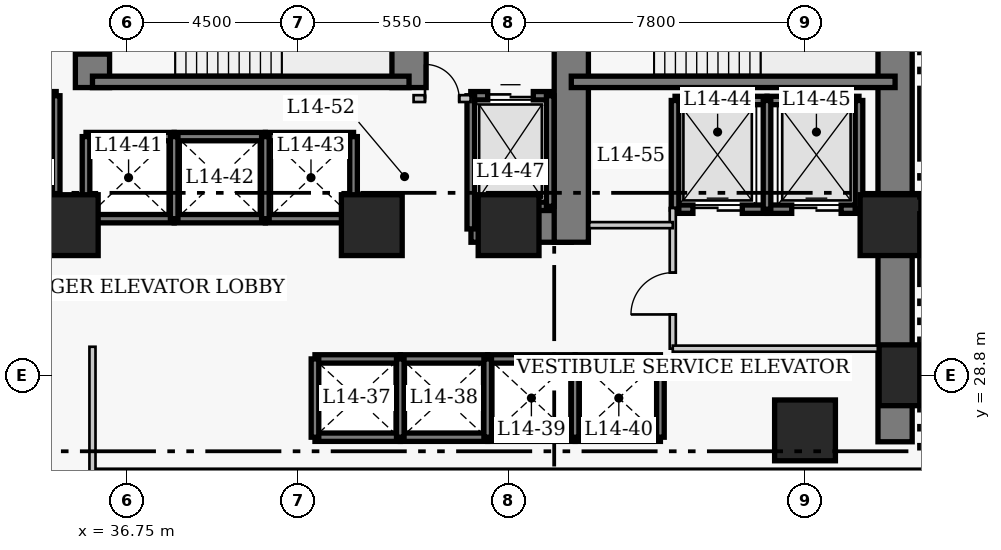
"""IFC4 building model, lengths in metres.
Left out: names, types, materials, properties, quantities, classifications, styles, units other than length and angle.
Written with IfcOpenShell. Run it as: python <this file> out.ifc"""

import sys

from ifc_helpers import new_model, si_unit, direction, frame, frame_2d, origin, origin_2d, place, context, subcontext, project, spatial, rectangle, extrude, element, fill, save


model = new_model("IFC4")
c1 = context("Model", 3, precision=1e-05, world=origin(), true_north=direction((0.0, 1.0)))
c2 = subcontext(c1, "Body", "Model", "MODEL_VIEW")
j1 = project(units=[si_unit("LENGTHUNIT", "METRE"), si_unit("PLANEANGLEUNIT", "RADIAN")], contexts=[c1])
p1 = place(None, origin())
s1 = spatial("IfcSite", under=j1, at=p1, CompositionType="ELEMENT")
p2 = place(p1, origin())
s2 = spatial("IfcBuilding", under=s1, at=p2, CompositionType="ELEMENT")
p3 = place(p2, frame((0.0, 0.0, 60.2)))
s3 = spatial("IfcBuildingStorey", under=s2, at=p3, CompositionType="ELEMENT", Elevation=60.2)
p4 = place(p3, frame((56.97, 27.05, 0.0), z_axis=(0.0, 0.0, 1.0), x_axis=(0.0, 1.0, 0.0)))
e1 = element("IfcWall", 1, at=p4, inside=s3, PredefinedType="SHEAR", context=c2, shape_type="SweptSolid", body=[
    extrude(rectangle(XDim=13.72, YDim=0.9, at=frame_2d((6.86, 0.0))), origin(), (0.0, 0.0, 1.0), 3.8),
])
p5 = place(p3, frame((45.81, 32.75, 0.0), z_axis=(0.0, 0.0, 1.0), x_axis=(1.0, 0.0, 0.0)))
e2 = element("IfcWall", 2, at=p5, inside=s3, PredefinedType="SHEAR", context=c2, shape_type="SweptSolid", body=[
    extrude(rectangle(XDim=2.64, YDim=0.9, at=frame_2d((1.32, 0.0))), origin(), (0.0, 0.0, 1.0), 3.8),
])
p6 = place(p3, frame((35.85, 36.37, 0.0), z_axis=(0.0, 0.0, 1.0), x_axis=(0.0, 1.0, 0.0)))
e3 = element("IfcWall", 3, at=p6, inside=s3, PredefinedType="SHEAR", context=c2, shape_type="SweptSolid", body=[
    extrude(rectangle(XDim=3.95, YDim=0.9, at=frame_2d((1.975, 0.0))), origin(), (0.0, 0.0, 1.0), 3.8),
])
p7 = place(p6, frame((0.88, 0.0, 0.0)))
e4 = element("IfcOpeningElement", 4, at=p7, cuts=e3, PredefinedType="OPENING", context=c2, shape_type="SweptSolid", body=[
    extrude(rectangle(XDim=1.1, YDim=2.15, at=frame_2d((0.55, 1.075))), frame((0.0, 0.46, 0.0), z_axis=(0.0, -1.0, 0.0), x_axis=(1.0, 0.0, 0.0)), (0.0, 0.0, 1.0), 0.92),
])
p8 = place(p3, frame((44.18, 36.37, 0.0), z_axis=(0.0, 0.0, 1.0), x_axis=(0.0, 1.0, 0.0)))
e5 = element("IfcWall", 5, at=p8, inside=s3, PredefinedType="SHEAR", context=c2, shape_type="SweptSolid", body=[
    extrude(rectangle(XDim=3.95, YDim=0.9, at=frame_2d((1.975, 0.0))), origin(), (0.0, 0.0, 1.0), 3.8),
])
p9 = place(p3, frame((48.45, 32.3, 0.0), z_axis=(0.0, 0.0, 1.0), x_axis=(0.0, 1.0, 0.0)))
e6 = element("IfcWall", 6, at=p9, inside=s3, PredefinedType="SHEAR", context=c2, shape_type="SweptSolid", body=[
    extrude(rectangle(XDim=8.02, YDim=0.9, at=frame_2d((4.01, 0.0))), origin(), (0.0, 0.0, 1.0), 3.8),
])
p10 = place(p9, frame((5.9, 0.0, 0.0)))
e7 = element("IfcOpeningElement", 7, at=p10, cuts=e6, PredefinedType="OPENING", context=c2, shape_type="SweptSolid", body=[
    extrude(rectangle(XDim=1.1, YDim=2.15, at=frame_2d((0.55, 1.075))), frame((0.0, 0.46, 0.0), z_axis=(0.0, -1.0, 0.0), x_axis=(1.0, 0.0, 0.0)), (0.0, 0.0, 1.0), 0.92),
])
p11 = place(p3, frame((35.85, 36.52, 0.0), z_axis=(0.0, 0.0, 1.0), x_axis=(1.0, 0.0, 0.0)))
e8 = element("IfcWall", 8, at=p11, inside=s3, PredefinedType="SHEAR", context=c2, shape_type="SweptSolid", body=[
    extrude(rectangle(XDim=8.33, YDim=0.3, at=frame_2d((4.165, 0.0))), origin(), (0.0, 0.0, 1.0), 3.8),
])
p12 = place(p3, frame((48.45, 36.52, 0.0), z_axis=(0.0, 0.0, 1.0), x_axis=(1.0, 0.0, 0.0)))
e9 = element("IfcWall", 9, at=p12, inside=s3, PredefinedType="SHEAR", context=c2, shape_type="SweptSolid", body=[
    extrude(rectangle(XDim=8.52, YDim=0.3, at=frame_2d((4.26, 0.0))), origin(), (0.0, 0.0, 1.0), 3.8),
])
for number, where, z_axis, x_axis in (
    (10, (57.35, 28.8, 0.0), (0.0, 0.0, 1.0), (1.0, 0.0, 0.0)),
    (11, (35.2, 32.75, 0.0), (0.0, 0.0, 1.0), (1.0, 0.0, 0.0)),
    (12, (43.2, 32.75, 0.0), (0.0, 0.0, 1.0), (1.0, 0.0, 0.0)),
    (13, (46.8, 32.75, 0.0), (0.0, 0.0, 1.0), (1.0, 0.0, 0.0)),
    (14, (54.6, 27.35, 0.0), (0.0, 0.0, 1.0), (1.0, 0.0, 0.0)),
    (15, (56.85, 32.75, 0.0), (0.0, 0.0, 1.0), (1.0, 0.0, 0.0)),
):
    element("IfcColumn", number, at=place(p3, frame(where, z_axis=z_axis, x_axis=x_axis)), inside=s3, PredefinedType="COLUMN", context=c2, shape_type="SweptSolid", body=[
        extrude(rectangle(XDim=1.6, YDim=1.6, at=origin_2d()), origin(), (0.0, 0.0, 1.0), 3.8),
    ])
for number, where, z_axis, x_axis in (
    (16, (41.705, 29.23, 0.0), (0.0, 0.0, 1.0), (1.0, 0.0, 0.0)),
    (17, (41.705, 27.17, 0.0), (0.0, 0.0, 1.0), (1.0, 0.0, 0.0)),
):
    element("IfcWall", number, at=place(p3, frame(where, z_axis=z_axis, x_axis=x_axis)), inside=s3, PredefinedType="SHEAR", context=c2, shape_type="SweptSolid", body=[
        extrude(rectangle(XDim=2.245, YDim=0.22, at=frame_2d((1.123, 0.0))), origin(), (0.0, 0.0, 1.0), 3.8),
    ])
p13 = place(p3, frame((41.705, 27.17, 0.0), z_axis=(0.0, 0.0, 1.0), x_axis=(0.0, 1.0, 0.0)))
e18 = element("IfcWall", 18, at=p13, inside=s3, PredefinedType="SHEAR", context=c2, shape_type="SweptSolid", body=[
    extrude(rectangle(XDim=2.06, YDim=0.2, at=frame_2d((1.03, 0.0))), origin(), (0.0, 0.0, 1.0), 3.8),
])
for number, where, z_axis, x_axis in (
    (19, (43.95, 29.23, 0.0), (0.0, 0.0, 1.0), (1.0, 0.0, 0.0)),
    (20, (43.95, 27.17, 0.0), (0.0, 0.0, 1.0), (1.0, 0.0, 0.0)),
):
    element("IfcWall", number, at=place(p3, frame(where, z_axis=z_axis, x_axis=x_axis)), inside=s3, PredefinedType="SHEAR", context=c2, shape_type="SweptSolid", body=[
        extrude(rectangle(XDim=2.3, YDim=0.22, at=frame_2d((1.15, 0.0))), origin(), (0.0, 0.0, 1.0), 3.8),
    ])
p14 = place(p3, frame((43.95, 27.17, 0.0), z_axis=(0.0, 0.0, 1.0), x_axis=(0.0, 1.0, 0.0)))
e21 = element("IfcWall", 21, at=p14, inside=s3, PredefinedType="SHEAR", context=c2, shape_type="SweptSolid", body=[
    extrude(rectangle(XDim=2.06, YDim=0.2, at=frame_2d((1.03, 0.0))), origin(), (0.0, 0.0, 1.0), 3.8),
])
for number, where, z_axis, x_axis in (
    (22, (46.25, 29.23, 0.0), (0.0, 0.0, 1.0), (1.0, 0.0, 0.0)),
    (23, (46.25, 27.17, 0.0), (0.0, 0.0, 1.0), (1.0, 0.0, 0.0)),
):
    element("IfcWall", number, at=place(p3, frame(where, z_axis=z_axis, x_axis=x_axis)), inside=s3, PredefinedType="SHEAR", context=c2, shape_type="SweptSolid", body=[
        extrude(rectangle(XDim=2.3, YDim=0.22, at=frame_2d((1.15, 0.0))), origin(), (0.0, 0.0, 1.0), 3.8),
    ])
p15 = place(p3, frame((46.25, 27.17, 0.0), z_axis=(0.0, 0.0, 1.0), x_axis=(0.0, 1.0, 0.0)))
e24 = element("IfcWall", 24, at=p15, inside=s3, PredefinedType="SHEAR", context=c2, shape_type="SweptSolid", body=[
    extrude(rectangle(XDim=2.06, YDim=0.2, at=frame_2d((1.03, 0.0))), origin(), (0.0, 0.0, 1.0), 3.8),
])
for number, where, z_axis, x_axis in (
    (25, (48.55, 29.23, 0.0), (0.0, 0.0, 1.0), (1.0, 0.0, 0.0)),
    (26, (48.55, 27.17, 0.0), (0.0, 0.0, 1.0), (1.0, 0.0, 0.0)),
):
    element("IfcWall", number, at=place(p3, frame(where, z_axis=z_axis, x_axis=x_axis)), inside=s3, PredefinedType="SHEAR", context=c2, shape_type="SweptSolid", body=[
        extrude(rectangle(XDim=2.245, YDim=0.22, at=frame_2d((1.123, 0.0))), origin(), (0.0, 0.0, 1.0), 3.8),
    ])
for number, where, z_axis, x_axis in (
    (27, (48.55, 27.17, 0.0), (0.0, 0.0, 1.0), (0.0, 1.0, 0.0)),
    (28, (50.795, 27.17, 0.0), (0.0, 0.0, 1.0), (0.0, 1.0, 0.0)),
):
    element("IfcWall", number, at=place(p3, frame(where, z_axis=z_axis, x_axis=x_axis)), inside=s3, PredefinedType="SHEAR", context=c2, shape_type="SweptSolid", body=[
        extrude(rectangle(XDim=2.06, YDim=0.2, at=frame_2d((1.03, 0.0))), origin(), (0.0, 0.0, 1.0), 3.8),
    ])
for number, where, z_axis, x_axis in (
    (29, (35.68, 35.08, 0.0), (0.0, 0.0, 1.0), (1.0, 0.0, 0.0)),
    (30, (35.68, 32.92, 0.0), (0.0, 0.0, 1.0), (1.0, 0.0, 0.0)),
):
    element("IfcWall", number, at=place(p3, frame(where, z_axis=z_axis, x_axis=x_axis)), inside=s3, PredefinedType="SHEAR", context=c2, shape_type="SweptSolid", body=[
        extrude(rectangle(XDim=2.32, YDim=0.22, at=frame_2d((1.16, 0.0))), origin(), (0.0, 0.0, 1.0), 3.8),
    ])
p16 = place(p3, frame((35.68, 32.92, 0.0), z_axis=(0.0, 0.0, 1.0), x_axis=(0.0, 1.0, 0.0)))
e31 = element("IfcWall", 31, at=p16, inside=s3, PredefinedType="SHEAR", context=c2, shape_type="SweptSolid", body=[
    extrude(rectangle(XDim=2.16, YDim=0.2, at=frame_2d((1.08, 0.0))), origin(), (0.0, 0.0, 1.0), 3.8),
])
for number, where, z_axis, x_axis in (
    (32, (38.0, 35.08, 0.0), (0.0, 0.0, 1.0), (1.0, 0.0, 0.0)),
    (33, (38.0, 32.92, 0.0), (0.0, 0.0, 1.0), (1.0, 0.0, 0.0)),
):
    element("IfcWall", number, at=place(p3, frame(where, z_axis=z_axis, x_axis=x_axis)), inside=s3, PredefinedType="SHEAR", context=c2, shape_type="SweptSolid", body=[
        extrude(rectangle(XDim=2.4, YDim=0.22, at=frame_2d((1.2, 0.0))), origin(), (0.0, 0.0, 1.0), 3.8),
    ])
p17 = place(p3, frame((38.0, 32.92, 0.0), z_axis=(0.0, 0.0, 1.0), x_axis=(0.0, 1.0, 0.0)))
e34 = element("IfcWall", 34, at=p17, inside=s3, PredefinedType="SHEAR", context=c2, shape_type="SweptSolid", body=[
    extrude(rectangle(XDim=2.16, YDim=0.2, at=frame_2d((1.08, 0.0))), origin(), (0.0, 0.0, 1.0), 3.8),
])
for number, where, z_axis, x_axis in (
    (35, (40.4, 35.08, 0.0), (0.0, 0.0, 1.0), (1.0, 0.0, 0.0)),
    (36, (40.4, 32.92, 0.0), (0.0, 0.0, 1.0), (1.0, 0.0, 0.0)),
):
    element("IfcWall", number, at=place(p3, frame(where, z_axis=z_axis, x_axis=x_axis)), inside=s3, PredefinedType="SHEAR", context=c2, shape_type="SweptSolid", body=[
        extrude(rectangle(XDim=2.32, YDim=0.22, at=frame_2d((1.16, 0.0))), origin(), (0.0, 0.0, 1.0), 3.8),
    ])
for number, where, z_axis, x_axis in (
    (37, (40.4, 32.92, 0.0), (0.0, 0.0, 1.0), (0.0, 1.0, 0.0)),
    (38, (42.72, 32.92, 0.0), (0.0, 0.0, 1.0), (0.0, 1.0, 0.0)),
):
    element("IfcWall", number, at=place(p3, frame(where, z_axis=z_axis, x_axis=x_axis)), inside=s3, PredefinedType="SHEAR", context=c2, shape_type="SweptSolid", body=[
        extrude(rectangle(XDim=2.16, YDim=0.2, at=frame_2d((1.08, 0.0))), origin(), (0.0, 0.0, 1.0), 3.8),
    ])
p18 = place(p3, frame((51.18, 36.03, 0.0), z_axis=(0.0, 0.0, 1.0), x_axis=(1.0, 0.0, 0.0)))
e39 = element("IfcWall", 39, at=p18, inside=s3, PredefinedType="SHEAR", context=c2, shape_type="SweptSolid", body=[
    extrude(rectangle(XDim=2.42, YDim=0.22, at=frame_2d((1.21, 0.0))), origin(), (0.0, 0.0, 1.0), 3.8),
])
p19 = place(p3, frame((51.18, 33.17, 0.0), z_axis=(0.0, 0.0, 1.0), x_axis=(1.0, 0.0, 0.0)))
e40 = element("IfcWall", 40, at=p19, inside=s3, PredefinedType="SHEAR", context=c2, shape_type="SweptSolid", body=[
    extrude(rectangle(XDim=2.42, YDim=0.22, at=frame_2d((1.21, 0.0))), origin(), (0.0, 0.0, 1.0), 3.8),
])
p20 = place(p19, frame((0.47, 0.0, 0.0)))
e41 = element("IfcOpeningElement", 41, at=p20, cuts=e40, PredefinedType="OPENING", context=c2, shape_type="SweptSolid", body=[
    extrude(rectangle(XDim=1.3, YDim=2.15, at=frame_2d((0.65, 1.075))), frame((0.0, 0.12, 0.0), z_axis=(0.0, -1.0, 0.0), x_axis=(1.0, 0.0, 0.0)), (0.0, 0.0, 1.0), 0.24),
])
p21 = place(p3, frame((51.18, 33.17, 0.0), z_axis=(0.0, 0.0, 1.0), x_axis=(0.0, 1.0, 0.0)))
e42 = element("IfcWall", 42, at=p21, inside=s3, PredefinedType="SHEAR", context=c2, shape_type="SweptSolid", body=[
    extrude(rectangle(XDim=2.86, YDim=0.2, at=frame_2d((1.43, 0.0))), origin(), (0.0, 0.0, 1.0), 3.8),
])
p22 = place(p3, frame((53.6, 36.03, 0.0), z_axis=(0.0, 0.0, 1.0), x_axis=(1.0, 0.0, 0.0)))
e43 = element("IfcWall", 43, at=p22, inside=s3, PredefinedType="SHEAR", context=c2, shape_type="SweptSolid", body=[
    extrude(rectangle(XDim=2.42, YDim=0.22, at=frame_2d((1.21, 0.0))), origin(), (0.0, 0.0, 1.0), 3.8),
])
p23 = place(p3, frame((53.6, 33.17, 0.0), z_axis=(0.0, 0.0, 1.0), x_axis=(1.0, 0.0, 0.0)))
e44 = element("IfcWall", 44, at=p23, inside=s3, PredefinedType="SHEAR", context=c2, shape_type="SweptSolid", body=[
    extrude(rectangle(XDim=2.42, YDim=0.22, at=frame_2d((1.21, 0.0))), origin(), (0.0, 0.0, 1.0), 3.8),
])
p24 = place(p23, frame((0.65, 0.0, 0.0)))
e45 = element("IfcOpeningElement", 45, at=p24, cuts=e44, PredefinedType="OPENING", context=c2, shape_type="SweptSolid", body=[
    extrude(rectangle(XDim=1.3, YDim=2.15, at=frame_2d((0.65, 1.075))), frame((0.0, 0.12, 0.0), z_axis=(0.0, -1.0, 0.0), x_axis=(1.0, 0.0, 0.0)), (0.0, 0.0, 1.0), 0.24),
])
for number, where, z_axis, x_axis in (
    (46, (53.6, 33.17, 0.0), (0.0, 0.0, 1.0), (0.0, 1.0, 0.0)),
    (47, (56.02, 33.17, 0.0), (0.0, 0.0, 1.0), (0.0, 1.0, 0.0)),
):
    element("IfcWall", number, at=place(p3, frame(where, z_axis=z_axis, x_axis=x_axis)), inside=s3, PredefinedType="SHEAR", context=c2, shape_type="SweptSolid", body=[
        extrude(rectangle(XDim=2.86, YDim=0.2, at=frame_2d((1.43, 0.0))), origin(), (0.0, 0.0, 1.0), 3.8),
    ])
p25 = place(p3, frame((32.805, 36.155, 0.0), z_axis=(0.0, 0.0, 1.0), x_axis=(1.0, 0.0, 0.0)))
e48 = element("IfcWall", 48, at=p25, inside=s3, PredefinedType="SHEAR", context=c2, shape_type="SweptSolid", body=[
    extrude(rectangle(XDim=2.09, YDim=0.22, at=frame_2d((1.045, 0.0))), origin(), (0.0, 0.0, 1.0), 3.8),
])
p26 = place(p25, frame((0.445, 0.0, 0.0)))
e49 = element("IfcOpeningElement", 49, at=p26, cuts=e48, PredefinedType="OPENING", context=c2, shape_type="SweptSolid", body=[
    extrude(rectangle(XDim=1.2, YDim=2.15, at=frame_2d((0.6, 1.075))), frame((0.0, 0.12, 0.0), z_axis=(0.0, -1.0, 0.0), x_axis=(1.0, 0.0, 0.0)), (0.0, 0.0, 1.0), 0.24),
])
p27 = place(p3, frame((32.805, 33.245, 0.0), z_axis=(0.0, 0.0, 1.0), x_axis=(1.0, 0.0, 0.0)))
e50 = element("IfcWall", 50, at=p27, inside=s3, PredefinedType="SHEAR", context=c2, shape_type="SweptSolid", body=[
    extrude(rectangle(XDim=2.09, YDim=0.22, at=frame_2d((1.045, 0.0))), origin(), (0.0, 0.0, 1.0), 3.8),
])
p28 = place(p3, frame((34.895, 33.245, 0.0), z_axis=(0.0, 0.0, 1.0), x_axis=(0.0, 1.0, 0.0)))
e51 = element("IfcWall", 51, at=p28, inside=s3, PredefinedType="SHEAR", context=c2, shape_type="SweptSolid", body=[
    extrude(rectangle(XDim=2.91, YDim=0.2, at=frame_2d((1.455, 0.0))), origin(), (0.0, 0.0, 1.0), 3.8),
])
p29 = place(p3, frame((45.805, 36.155, 0.0), z_axis=(0.0, 0.0, 1.0), x_axis=(1.0, 0.0, 0.0)))
e52 = element("IfcWall", 52, at=p29, inside=s3, PredefinedType="SHEAR", context=c2, shape_type="SweptSolid", body=[
    extrude(rectangle(XDim=2.09, YDim=0.22, at=frame_2d((1.045, 0.0))), origin(), (0.0, 0.0, 1.0), 3.8),
])
p30 = place(p29, frame((0.445, 0.0, 0.0)))
e53 = element("IfcOpeningElement", 53, at=p30, cuts=e52, PredefinedType="OPENING", context=c2, shape_type="SweptSolid", body=[
    extrude(rectangle(XDim=1.2, YDim=2.15, at=frame_2d((0.6, 1.075))), frame((0.0, 0.12, 0.0), z_axis=(0.0, -1.0, 0.0), x_axis=(1.0, 0.0, 0.0)), (0.0, 0.0, 1.0), 0.24),
])
p31 = place(p3, frame((45.805, 33.245, 0.0), z_axis=(0.0, 0.0, 1.0), x_axis=(1.0, 0.0, 0.0)))
e54 = element("IfcWall", 54, at=p31, inside=s3, PredefinedType="SHEAR", context=c2, shape_type="SweptSolid", body=[
    extrude(rectangle(XDim=2.09, YDim=0.22, at=frame_2d((1.045, 0.0))), origin(), (0.0, 0.0, 1.0), 3.8),
])
p32 = place(p3, frame((45.805, 32.65, 0.0), z_axis=(0.0, 0.0, 1.0), x_axis=(0.0, 1.0, 0.0)))
e55 = element("IfcWall", 55, at=p32, inside=s3, PredefinedType="SHEAR", context=c2, shape_type="SweptSolid", body=[
    extrude(rectangle(XDim=3.505, YDim=0.2, at=frame_2d((1.752, 0.0))), origin(), (0.0, 0.0, 1.0), 3.8),
])
p33 = place(p3, frame((47.895, 33.245, 0.0), z_axis=(0.0, 0.0, 1.0), x_axis=(0.0, 1.0, 0.0)))
e56 = element("IfcWall", 56, at=p33, inside=s3, PredefinedType="SHEAR", context=c2, shape_type="SweptSolid", body=[
    extrude(rectangle(XDim=2.91, YDim=0.2, at=frame_2d((1.455, 0.0))), origin(), (0.0, 0.0, 1.0), 3.8),
])
p34 = place(p3, frame((44.3, 36.08, 0.0), z_axis=(0.0, 0.0, 1.0), x_axis=(1.0, 0.0, 0.0)))
e57 = element("IfcWall", 57, at=p34, inside=s3, PredefinedType="PARTITIONING", context=c2, shape_type="SweptSolid", body=[
    extrude(rectangle(XDim=1.5, YDim=0.18, at=frame_2d((0.75, 0.0))), origin(), (0.0, 0.0, 1.0), 3.54),
])
p35 = place(p34, frame((0.3, 0.0, 0.0)))
e58 = element("IfcOpeningElement", 58, at=p35, cuts=e57, PredefinedType="OPENING", context=c2, shape_type="SweptSolid", body=[
    extrude(rectangle(XDim=0.9, YDim=2.15, at=frame_2d((0.45, 1.075))), frame((0.0, 0.1, 0.0), z_axis=(0.0, -1.0, 0.0), x_axis=(1.0, 0.0, 0.0)), (0.0, 0.0, 1.0), 0.2),
])
p36 = place(p3, frame((51.12, 29.5, 0.0), z_axis=(0.0, 0.0, 1.0), x_axis=(0.0, 1.0, 0.0)))
e59 = element("IfcWall", 59, at=p36, inside=s3, PredefinedType="PARTITIONING", context=c2, shape_type="SweptSolid", body=[
    extrude(rectangle(XDim=3.7, YDim=0.16, at=frame_2d((1.85, 0.0))), origin(), (0.0, 0.0, 1.0), 3.54),
])
p37 = place(p36, frame((0.9, 0.0, 0.0)))
e60 = element("IfcOpeningElement", 60, at=p37, cuts=e59, PredefinedType="OPENING", context=c2, shape_type="SweptSolid", body=[
    extrude(rectangle(XDim=1.1, YDim=2.15, at=frame_2d((0.55, 1.075))), frame((0.0, 0.09, 0.0), z_axis=(0.0, -1.0, 0.0), x_axis=(1.0, 0.0, 0.0)), (0.0, 0.0, 1.0), 0.18),
])
p38 = place(p3, frame((51.12, 29.5, 0.0), z_axis=(0.0, 0.0, 1.0), x_axis=(1.0, 0.0, 0.0)))
e61 = element("IfcWall", 61, at=p38, inside=s3, PredefinedType="PARTITIONING", context=c2, shape_type="SweptSolid", body=[
    extrude(rectangle(XDim=5.63, YDim=0.16, at=frame_2d((2.815, 0.0))), origin(), (0.0, 0.0, 1.0), 3.54),
])
p39 = place(p3, frame((48.92, 32.75, 0.0), z_axis=(0.0, 0.0, 1.0), x_axis=(1.0, 0.0, 0.0)))
e62 = element("IfcWall", 62, at=p39, inside=s3, PredefinedType="PARTITIONING", context=c2, shape_type="SweptSolid", body=[
    extrude(rectangle(XDim=2.2, YDim=0.16, at=frame_2d((1.1, 0.0))), origin(), (0.0, 0.0, 1.0), 3.54),
])
p40 = place(p3, frame((35.85, 26.26, 0.0), z_axis=(0.0, 0.0, 1.0), x_axis=(1.0, 0.0, 0.0)))
e63 = element("IfcWall", 63, at=p40, inside=s3, PredefinedType="PARTITIONING", context=c2, shape_type="SweptSolid", body=[
    extrude(rectangle(XDim=23.45, YDim=0.16, at=frame_2d((11.725, 0.0))), origin(), (0.0, 0.0, 1.0), 3.54),
])
p41 = place(p3, frame((35.85, 26.26, 0.0), z_axis=(0.0, 0.0, 1.0), x_axis=(0.0, 1.0, 0.0)))
e64 = element("IfcWall", 64, at=p41, inside=s3, PredefinedType="PARTITIONING", context=c2, shape_type="SweptSolid", body=[
    extrude(rectangle(XDim=3.29, YDim=0.16, at=frame_2d((1.645, 0.0))), origin(), (0.0, 0.0, 1.0), 3.54),
])
p42 = place(p20, origin())
e65 = element("IfcDoor", 65, at=p42, inside=s3, OperationType="DOUBLE_DOOR_SLIDING", PredefinedType="DOOR", context=c2, shape_type="SweptSolid", body=[
    extrude(rectangle(XDim=1.3, YDim=2.15, at=frame_2d((0.65, 1.075))), frame((0.0, 0.025, 0.0), z_axis=(0.0, -1.0, 0.0), x_axis=(1.0, 0.0, 0.0)), (0.0, 0.0, 1.0), 0.05),
])
fill(e41, e65)
p43 = place(p24, origin())
e66 = element("IfcDoor", 66, at=p43, inside=s3, OperationType="DOUBLE_DOOR_SLIDING", PredefinedType="DOOR", context=c2, shape_type="SweptSolid", body=[
    extrude(rectangle(XDim=1.3, YDim=2.15, at=frame_2d((0.65, 1.075))), frame((0.0, 0.025, 0.0), z_axis=(0.0, -1.0, 0.0), x_axis=(1.0, 0.0, 0.0)), (0.0, 0.0, 1.0), 0.05),
])
fill(e45, e66)
p44 = place(p30, origin())
e67 = element("IfcDoor", 67, at=p44, inside=s3, OperationType="DOUBLE_DOOR_SLIDING", PredefinedType="DOOR", context=c2, shape_type="SweptSolid", body=[
    extrude(rectangle(XDim=1.2, YDim=2.15, at=frame_2d((0.6, 1.075))), frame((0.0, 0.025, 0.0), z_axis=(0.0, -1.0, 0.0), x_axis=(1.0, 0.0, 0.0)), (0.0, 0.0, 1.0), 0.05),
])
fill(e53, e67)
p45 = place(p35, origin())
e68 = element("IfcDoor", 68, at=p45, inside=s3, OperationType="SINGLE_SWING_LEFT", PredefinedType="DOOR", context=c2, shape_type="SweptSolid", body=[
    extrude(rectangle(XDim=0.9, YDim=2.15, at=frame_2d((0.45, 1.075))), frame((0.0, 0.025, 0.0), z_axis=(0.0, -1.0, 0.0), x_axis=(1.0, 0.0, 0.0)), (0.0, 0.0, 1.0), 0.05),
])
fill(e58, e68)
p46 = place(p37, origin())
e69 = element("IfcDoor", 69, at=p46, inside=s3, OperationType="SINGLE_SWING_LEFT", PredefinedType="DOOR", context=c2, shape_type="SweptSolid", body=[
    extrude(rectangle(XDim=1.1, YDim=2.15, at=frame_2d((0.55, 1.075))), frame((0.0, 0.025, 0.0), z_axis=(0.0, -1.0, 0.0), x_axis=(1.0, 0.0, 0.0)), (0.0, 0.0, 1.0), 0.05),
])
fill(e60, e69)
p47 = place(p7, origin())
e70 = element("IfcDoor", 70, at=p47, inside=s3, OperationType="SINGLE_SWING_RIGHT", PredefinedType="DOOR", context=c2, shape_type="SweptSolid", body=[
    extrude(rectangle(XDim=1.1, YDim=2.15, at=frame_2d((0.55, 1.075))), frame((0.0, 0.025, 0.0), z_axis=(0.0, -1.0, 0.0), x_axis=(1.0, 0.0, 0.0)), (0.0, 0.0, 1.0), 0.05),
])
fill(e4, e70)
save(model, sys.argv[1])
